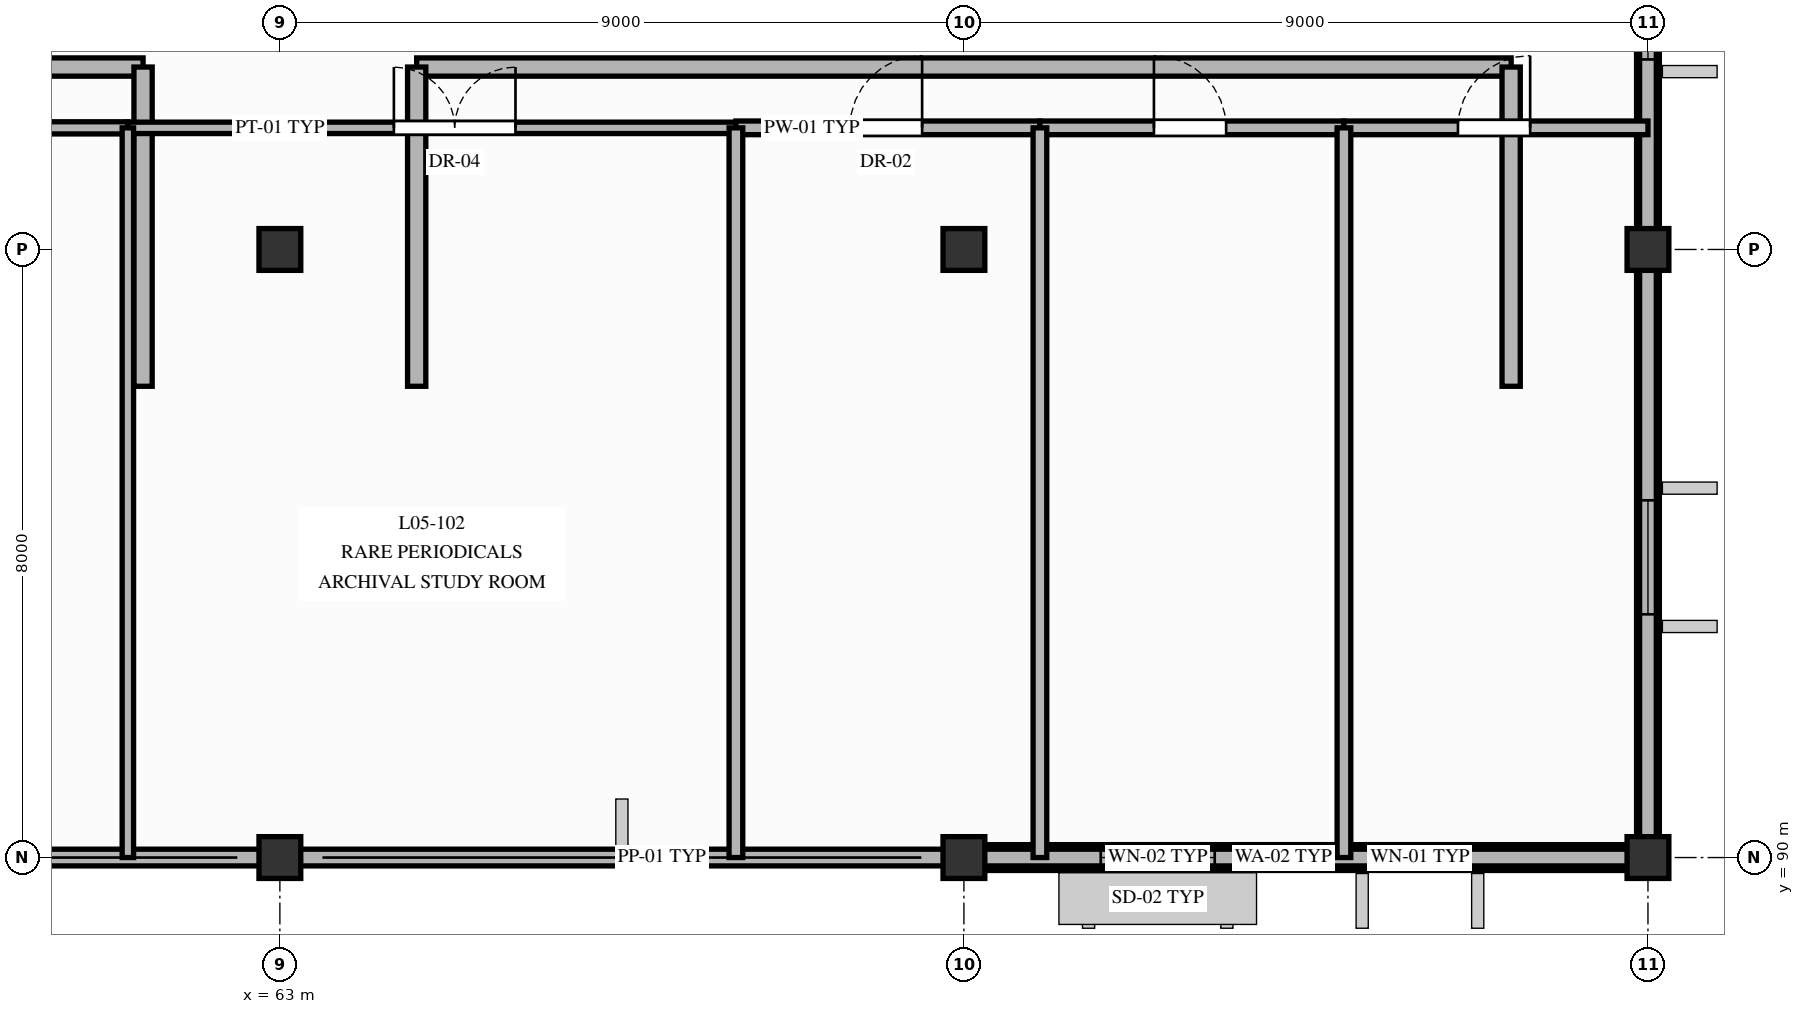
"""IFC4 building model, lengths in metres.
Left out: names, types, materials, properties, quantities, classifications, styles, units other than length and angle.
Written with IfcOpenShell. Run it as: python <this file> out.ifc"""

import sys

from ifc_helpers import new_model, si_unit, direction, frame, frame_2d, origin, origin_2d, place, context, subcontext, project, spatial, polyline, rectangle, outline, extrude, element, fill, save


model = new_model("IFC4")
c1 = context("Model", 3, precision=1e-05, world=origin(), true_north=direction((0.0, 1.0)))
c2 = subcontext(c1, "Body", "Model", "MODEL_VIEW")
j1 = project(units=[si_unit("LENGTHUNIT", "METRE"), si_unit("PLANEANGLEUNIT", "RADIAN")], contexts=[c1])
p1 = place(None, origin())
s1 = spatial("IfcSite", under=j1, at=p1, CompositionType="ELEMENT")
p2 = place(p1, origin())
s2 = spatial("IfcBuilding", under=s1, at=p2, CompositionType="ELEMENT")
p3 = place(p2, frame((0.0, 0.0, 20.26)))
s3 = spatial("IfcBuildingStorey", under=s2, at=p3, CompositionType="ELEMENT", Elevation=20.26)
for number, where, z_axis, x_axis in (
    (1, (63.0, 90.0, 0.0), (0.0, 0.0, 1.0), (1.0, 0.0, 0.0)),
    (2, (63.0, 98.0, 0.0), (0.0, 0.0, 1.0), (1.0, 0.0, 0.0)),
    (3, (72.0, 90.0, 0.0), (0.0, 0.0, 1.0), (1.0, 0.0, 0.0)),
    (4, (72.0, 98.0, 0.0), (0.0, 0.0, 1.0), (1.0, 0.0, 0.0)),
    (5, (81.0, 90.0, 0.0), (0.0, 0.0, 1.0), (1.0, 0.0, 0.0)),
    (6, (81.0, 98.0, 0.0), (0.0, 0.0, 1.0), (1.0, 0.0, 0.0)),
):
    element("IfcColumn", number, at=place(p3, frame(where, z_axis=z_axis, x_axis=x_axis)), inside=s3, PredefinedType="COLUMN", context=c2, shape_type="SweptSolid", body=[
        extrude(rectangle(XDim=0.55, YDim=0.55, at=origin_2d()), origin(), (0.0, 0.0, 1.0), 3.64),
    ])
p4 = place(p3, frame((72.0, 90.0, 0.0), z_axis=(0.0, 0.0, 1.0), x_axis=(1.0, 0.0, 0.0)))
e7 = element("IfcWall", 7, at=p4, inside=s3, PredefinedType="SOLIDWALL", context=c2, shape_type="SweptSolid", body=[
    extrude(rectangle(XDim=9.0, YDim=0.34, at=frame_2d((4.5, 0.0))), origin(), (0.0, 0.0, 1.0), 3.39),
])
p5 = place(p4, frame((1.8, 0.0, 0.545)))
e8 = element("IfcOpeningElement", 8, at=p5, cuts=e7, PredefinedType="OPENING", context=c2, shape_type="SweptSolid", body=[
    extrude(rectangle(XDim=1.5, YDim=2.1, at=frame_2d((0.75, 1.05))), frame((0.0, 0.18, 0.0), z_axis=(0.0, -1.0, 0.0), x_axis=(1.0, 0.0, 0.0)), (0.0, 0.0, 1.0), 0.36),
])
p6 = place(p4, frame((5.4, 0.0, 0.545)))
e9 = element("IfcOpeningElement", 9, at=p6, cuts=e7, PredefinedType="OPENING", context=c2, shape_type="SweptSolid", body=[
    extrude(rectangle(XDim=1.2, YDim=2.1, at=frame_2d((0.6, 1.05))), frame((0.0, 0.18, 0.0), z_axis=(0.0, -1.0, 0.0), x_axis=(1.0, 0.0, 0.0)), (0.0, 0.0, 1.0), 0.36),
])
p7 = place(p3, frame((81.0, 90.0, 0.0), z_axis=(0.0, 0.0, 1.0), x_axis=(0.0, 1.0, 0.0)))
e10 = element("IfcWall", 10, at=p7, inside=s3, PredefinedType="SOLIDWALL", context=c2, shape_type="SweptSolid", body=[
    extrude(rectangle(XDim=24.0, YDim=0.3, at=frame_2d((12.0, 0.0))), origin(), (0.0, 0.0, 1.0), 2.585),
])
p8 = place(p7, frame((3.2, 0.0, 0.365)))
e11 = element("IfcOpeningElement", 11, at=p8, cuts=e10, PredefinedType="OPENING", context=c2, shape_type="SweptSolid", body=[
    extrude(rectangle(XDim=1.5, YDim=2.1, at=frame_2d((0.75, 1.05))), frame((0.0, 0.16, 0.0), z_axis=(0.0, -1.0, 0.0), x_axis=(1.0, 0.0, 0.0)), (0.0, 0.0, 1.0), 0.32),
])
p9 = place(p7, frame((10.5, 0.0, 0.615)))
e12 = element("IfcOpeningElement", 12, at=p9, cuts=e10, PredefinedType="OPENING", context=c2, shape_type="SweptSolid", body=[
    extrude(rectangle(XDim=1.35, YDim=1.85, at=frame_2d((0.675, 0.925))), frame((0.0, 0.16, 0.0), z_axis=(0.0, -1.0, 0.0), x_axis=(1.0, 0.0, 0.0)), (0.0, 0.0, 1.0), 0.32),
])
p10 = place(p3, frame((46.8, 100.4, 3.64), z_axis=(0.0, 0.0, 1.0), x_axis=(1.0, 0.0, 0.0)))
e13 = element("IfcWall", 13, at=p10, inside=s3, PredefinedType="SOLIDWALL", context=c2, shape_type="SweptSolid", body=[
    extrude(rectangle(XDim=14.4, YDim=0.24, at=frame_2d((7.2, 0.0))), origin(), (0.0, 0.0, 1.0), 0.92),
])
p11 = place(p3, frame((61.2, 96.2, 3.64), z_axis=(0.0, 0.0, 1.0), x_axis=(0.0, 1.0, 0.0)))
e14 = element("IfcWall", 14, at=p11, inside=s3, PredefinedType="SOLIDWALL", context=c2, shape_type="SweptSolid", body=[
    extrude(outline(polyline([(0.0, 0.0), (4.2, 0.0), (4.2, 0.92), (0.0, 0.22), (0.0, 0.0)])), frame((0.0, 0.12, 0.0), z_axis=(0.0, -1.0, 0.0), x_axis=(1.0, 0.0, 0.0)), (0.0, 0.0, 1.0), 0.24),
])
p12 = place(p3, frame((64.8, 100.4, 3.64), z_axis=(0.0, 0.0, 1.0), x_axis=(1.0, 0.0, 0.0)))
e15 = element("IfcWall", 15, at=p12, inside=s3, PredefinedType="SOLIDWALL", context=c2, shape_type="SweptSolid", body=[
    extrude(rectangle(XDim=14.4, YDim=0.24, at=frame_2d((7.2, 0.0))), origin(), (0.0, 0.0, 1.0), 0.92),
])
for number, where, z_axis, x_axis in (
    (16, (64.8, 96.2, 3.64), (0.0, 0.0, 1.0), (0.0, 1.0, 0.0)),
    (17, (79.2, 96.2, 3.64), (0.0, 0.0, 1.0), (0.0, 1.0, 0.0)),
):
    element("IfcWall", number, at=place(p3, frame(where, z_axis=z_axis, x_axis=x_axis)), inside=s3, PredefinedType="SOLIDWALL", context=c2, shape_type="SweptSolid", body=[
        extrude(outline(polyline([(0.0, 0.0), (4.2, 0.0), (4.2, 0.92), (0.0, 0.22), (0.0, 0.0)])), frame((0.0, 0.12, 0.0), z_axis=(0.0, -1.0, 0.0), x_axis=(1.0, 0.0, 0.0)), (0.0, 0.0, 1.0), 0.24),
    ])
p13 = place(p3, frame((45.22, 90.0, 3.64), z_axis=(0.0, 0.0, 1.0), x_axis=(1.0, 0.0, 0.0)))
e18 = element("IfcWall", 18, at=p13, inside=s3, PredefinedType="PARAPET", context=c2, shape_type="SweptSolid", body=[
    extrude(rectangle(XDim=35.56, YDim=0.22, at=frame_2d((17.78, 0.0))), origin(), (0.0, 0.0, 1.0), 0.42),
])
p14 = place(p3, frame((81.0, 90.22, 3.64), z_axis=(0.0, 0.0, 1.0), x_axis=(0.0, 1.0, 0.0)))
e19 = element("IfcWall", 19, at=p14, inside=s3, PredefinedType="PARAPET", context=c2, shape_type="SweptSolid", body=[
    extrude(rectangle(XDim=23.56, YDim=0.22, at=frame_2d((11.78, 0.0))), origin(), (0.0, 0.0, 1.0), 0.42),
])
p15 = place(p3, frame((45.0, 99.6, 0.0), z_axis=(0.0, 0.0, 1.0), x_axis=(1.0, 0.0, 0.0)))
e20 = element("IfcWall", 20, at=p15, inside=s3, PredefinedType="PARTITIONING", context=c2, shape_type="SweptSolid", body=[
    extrude(rectangle(XDim=16.0, YDim=0.16, at=frame_2d((8.0, 0.0))), origin(), (0.0, 0.0, 1.0), 3.39),
])
p16 = place(p15, frame((7.5, 0.0, 0.0)))
e21 = element("IfcOpeningElement", 21, at=p16, cuts=e20, PredefinedType="OPENING", context=c2, shape_type="SweptSolid", body=[
    extrude(rectangle(XDim=1.6, YDim=2.2, at=frame_2d((0.8, 1.1))), frame((0.0, 0.09, 0.0), z_axis=(0.0, -1.0, 0.0), x_axis=(1.0, 0.0, 0.0)), (0.0, 0.0, 1.0), 0.18),
])
p17 = place(p3, frame((61.0, 99.6, 0.0), z_axis=(0.0, 0.0, 1.0), x_axis=(1.0, 0.0, 0.0)))
e22 = element("IfcWall", 22, at=p17, inside=s3, PredefinedType="PARTITIONING", context=c2, shape_type="SweptSolid", body=[
    extrude(rectangle(XDim=8.0, YDim=0.15, at=frame_2d((4.0, 0.0))), origin(), (0.0, 0.0, 1.0), 3.39),
])
p18 = place(p17, frame((3.5, 0.0, 0.0)))
e23 = element("IfcOpeningElement", 23, at=p18, cuts=e22, PredefinedType="OPENING", context=c2, shape_type="SweptSolid", body=[
    extrude(rectangle(XDim=1.6, YDim=2.2, at=frame_2d((0.8, 1.1))), frame((0.0, 0.085, 0.0), z_axis=(0.0, -1.0, 0.0), x_axis=(1.0, 0.0, 0.0)), (0.0, 0.0, 1.0), 0.17),
])
p19 = place(p3, frame((61.0, 90.0, 0.0), z_axis=(0.0, 0.0, 1.0), x_axis=(0.0, 1.0, 0.0)))
e24 = element("IfcWall", 24, at=p19, inside=s3, PredefinedType="PARTITIONING", context=c2, shape_type="SweptSolid", body=[
    extrude(rectangle(XDim=9.6, YDim=0.15, at=frame_2d((4.8, 0.0))), origin(), (0.0, 0.0, 1.0), 3.39),
])
p20 = place(p3, frame((69.0, 99.6, 0.0), z_axis=(0.0, 0.0, 1.0), x_axis=(1.0, 0.0, 0.0)))
e25 = element("IfcWall", 25, at=p20, inside=s3, PredefinedType="PLUMBINGWALL", context=c2, shape_type="SweptSolid", body=[
    extrude(rectangle(XDim=4.0, YDim=0.18, at=frame_2d((2.0, 0.0))), origin(), (0.0, 0.0, 1.0), 3.39),
])
p21 = place(p20, frame((1.5, 0.0, 0.0)))
e26 = element("IfcOpeningElement", 26, at=p21, cuts=e25, PredefinedType="OPENING", context=c2, shape_type="SweptSolid", body=[
    extrude(rectangle(XDim=0.95, YDim=2.15, at=frame_2d((0.475, 1.075))), frame((0.0, 0.1, 0.0), z_axis=(0.0, -1.0, 0.0), x_axis=(1.0, 0.0, 0.0)), (0.0, 0.0, 1.0), 0.2),
])
p22 = place(p3, frame((69.0, 90.0, 0.0), z_axis=(0.0, 0.0, 1.0), x_axis=(0.0, 1.0, 0.0)))
e27 = element("IfcWall", 27, at=p22, inside=s3, PredefinedType="PLUMBINGWALL", context=c2, shape_type="SweptSolid", body=[
    extrude(rectangle(XDim=9.6, YDim=0.18, at=frame_2d((4.8, 0.0))), origin(), (0.0, 0.0, 1.0), 3.39),
])
p23 = place(p3, frame((73.0, 99.6, 0.0), z_axis=(0.0, 0.0, 1.0), x_axis=(1.0, 0.0, 0.0)))
e28 = element("IfcWall", 28, at=p23, inside=s3, PredefinedType="PLUMBINGWALL", context=c2, shape_type="SweptSolid", body=[
    extrude(rectangle(XDim=4.0, YDim=0.18, at=frame_2d((2.0, 0.0))), origin(), (0.0, 0.0, 1.0), 3.39),
])
p24 = place(p23, frame((1.5, 0.0, 0.0)))
e29 = element("IfcOpeningElement", 29, at=p24, cuts=e28, PredefinedType="OPENING", context=c2, shape_type="SweptSolid", body=[
    extrude(rectangle(XDim=0.95, YDim=2.15, at=frame_2d((0.475, 1.075))), frame((0.0, 0.1, 0.0), z_axis=(0.0, -1.0, 0.0), x_axis=(1.0, 0.0, 0.0)), (0.0, 0.0, 1.0), 0.2),
])
p25 = place(p3, frame((73.0, 90.0, 0.0), z_axis=(0.0, 0.0, 1.0), x_axis=(0.0, 1.0, 0.0)))
e30 = element("IfcWall", 30, at=p25, inside=s3, PredefinedType="PLUMBINGWALL", context=c2, shape_type="SweptSolid", body=[
    extrude(rectangle(XDim=9.6, YDim=0.18, at=frame_2d((4.8, 0.0))), origin(), (0.0, 0.0, 1.0), 3.39),
])
p26 = place(p3, frame((77.0, 99.6, 0.0), z_axis=(0.0, 0.0, 1.0), x_axis=(1.0, 0.0, 0.0)))
e31 = element("IfcWall", 31, at=p26, inside=s3, PredefinedType="PLUMBINGWALL", context=c2, shape_type="SweptSolid", body=[
    extrude(rectangle(XDim=4.0, YDim=0.18, at=frame_2d((2.0, 0.0))), origin(), (0.0, 0.0, 1.0), 3.39),
])
p27 = place(p26, frame((1.5, 0.0, 0.0)))
e32 = element("IfcOpeningElement", 32, at=p27, cuts=e31, PredefinedType="OPENING", context=c2, shape_type="SweptSolid", body=[
    extrude(rectangle(XDim=0.95, YDim=2.15, at=frame_2d((0.475, 1.075))), frame((0.0, 0.1, 0.0), z_axis=(0.0, -1.0, 0.0), x_axis=(1.0, 0.0, 0.0)), (0.0, 0.0, 1.0), 0.2),
])
p28 = place(p3, frame((77.0, 90.0, 0.0), z_axis=(0.0, 0.0, 1.0), x_axis=(0.0, 1.0, 0.0)))
e33 = element("IfcWall", 33, at=p28, inside=s3, PredefinedType="PLUMBINGWALL", context=c2, shape_type="SweptSolid", body=[
    extrude(rectangle(XDim=9.6, YDim=0.18, at=frame_2d((4.8, 0.0))), origin(), (0.0, 0.0, 1.0), 3.39),
])
p29 = place(p5, origin())
e34 = element("IfcWindow", 34, at=p29, inside=s3, PartitioningType="SINGLE_PANEL", PredefinedType="WINDOW", context=c2, shape_type="SweptSolid", body=[
    extrude(rectangle(XDim=1.5, YDim=2.1, at=frame_2d((0.75, 1.05))), frame((0.0, 0.03, 0.0), z_axis=(0.0, -1.0, 0.0), x_axis=(1.0, 0.0, 0.0)), (0.0, 0.0, 1.0), 0.06),
])
fill(e8, e34)
p30 = place(p6, origin())
e35 = element("IfcWindow", 35, at=p30, inside=s3, PartitioningType="SINGLE_PANEL", PredefinedType="WINDOW", context=c2, shape_type="SweptSolid", body=[
    extrude(rectangle(XDim=1.2, YDim=2.1, at=frame_2d((0.6, 1.05))), frame((0.0, 0.03, 0.0), z_axis=(0.0, -1.0, 0.0), x_axis=(1.0, 0.0, 0.0)), (0.0, 0.0, 1.0), 0.06),
])
fill(e9, e35)
p31 = place(p8, origin())
e36 = element("IfcWindow", 36, at=p31, inside=s3, PartitioningType="SINGLE_PANEL", PredefinedType="WINDOW", context=c2, shape_type="SweptSolid", body=[
    extrude(rectangle(XDim=1.5, YDim=2.1, at=frame_2d((0.75, 1.05))), frame((0.0, 0.03, 0.0), z_axis=(0.0, -1.0, 0.0), x_axis=(1.0, 0.0, 0.0)), (0.0, 0.0, 1.0), 0.06),
])
fill(e11, e36)
p32 = place(p9, origin())
e37 = element("IfcWindow", 37, at=p32, inside=s3, PartitioningType="SINGLE_PANEL", PredefinedType="WINDOW", context=c2, shape_type="SweptSolid", body=[
    extrude(rectangle(XDim=1.35, YDim=1.85, at=frame_2d((0.675, 0.925))), frame((0.0, 0.03, 0.0), z_axis=(0.0, -1.0, 0.0), x_axis=(1.0, 0.0, 0.0)), (0.0, 0.0, 1.0), 0.06),
])
fill(e12, e37)
p33 = place(p18, origin())
e38 = element("IfcDoor", 38, at=p33, inside=s3, OperationType="DOUBLE_DOOR_SINGLE_SWING", PredefinedType="DOOR", context=c2, shape_type="SweptSolid", body=[
    extrude(rectangle(XDim=1.6, YDim=2.2, at=frame_2d((0.8, 1.1))), frame((0.0, 0.025, 0.0), z_axis=(0.0, -1.0, 0.0), x_axis=(1.0, 0.0, 0.0)), (0.0, 0.0, 1.0), 0.05),
])
fill(e23, e38)
p34 = place(p21, origin())
e39 = element("IfcDoor", 39, at=p34, inside=s3, OperationType="SINGLE_SWING_RIGHT", PredefinedType="DOOR", context=c2, shape_type="SweptSolid", body=[
    extrude(rectangle(XDim=0.95, YDim=2.15, at=frame_2d((0.475, 1.075))), frame((0.0, 0.025, 0.0), z_axis=(0.0, -1.0, 0.0), x_axis=(1.0, 0.0, 0.0)), (0.0, 0.0, 1.0), 0.05),
])
fill(e26, e39)
p35 = place(p24, origin())
e40 = element("IfcDoor", 40, at=p35, inside=s3, OperationType="SINGLE_SWING_LEFT", PredefinedType="DOOR", context=c2, shape_type="SweptSolid", body=[
    extrude(rectangle(XDim=0.95, YDim=2.15, at=frame_2d((0.475, 1.075))), frame((0.0, 0.025, 0.0), z_axis=(0.0, -1.0, 0.0), x_axis=(1.0, 0.0, 0.0)), (0.0, 0.0, 1.0), 0.05),
])
fill(e29, e40)
p36 = place(p27, origin())
e41 = element("IfcDoor", 41, at=p36, inside=s3, OperationType="SINGLE_SWING_RIGHT", PredefinedType="DOOR", context=c2, shape_type="SweptSolid", body=[
    extrude(rectangle(XDim=0.95, YDim=2.15, at=frame_2d((0.475, 1.075))), frame((0.0, 0.025, 0.0), z_axis=(0.0, -1.0, 0.0), x_axis=(1.0, 0.0, 0.0)), (0.0, 0.0, 1.0), 0.05),
])
fill(e32, e41)
save(model, sys.argv[1])
